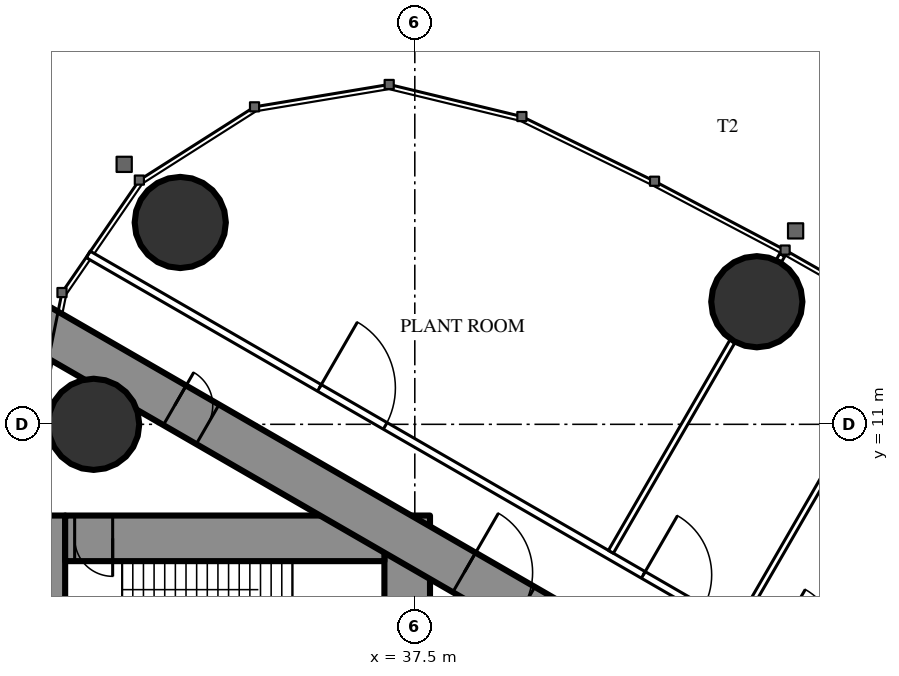
"""IFC4 building model, lengths in metres.
Left out: names, types, materials, properties, quantities, classifications, styles, units other than length and angle.
Written with IfcOpenShell. Run it as: python <this file> out.ifc"""

import sys

from ifc_helpers import new_model, si_unit, direction, frame, frame_2d, origin, origin_2d, place, context, subcontext, project, spatial, rectangle, circle, extrude, element, fill, save


model = new_model("IFC4")
c1 = context("Model", 3, precision=1e-05, world=origin(), true_north=direction((0.0, 1.0)))
c2 = subcontext(c1, "Body", "Model", "MODEL_VIEW")
j1 = project(units=[si_unit("LENGTHUNIT", "METRE"), si_unit("PLANEANGLEUNIT", "RADIAN")], contexts=[c1])
p1 = place(None, origin())
s1 = spatial("IfcSite", under=j1, at=p1, CompositionType="ELEMENT")
p2 = place(p1, origin())
s2 = spatial("IfcBuilding", under=s1, at=p2, CompositionType="ELEMENT")
p3 = place(p2, frame((0.0, 0.0, 257.3)))
s3 = spatial("IfcBuildingStorey", under=s2, at=p3, CompositionType="ELEMENT", Elevation=257.3)
for number, where, z_axis, x_axis in (
    (1, (31.328, 16.311, 0.0), (0.0, 0.0, 1.0), (1.0, 0.0, 0.0)),
    (2, (29.05, 11.0, 0.0), (0.0, 0.0, 1.0), (1.0, 0.0, 0.0)),
    (3, (46.499, 14.226, 0.0), (0.0, 0.0, 1.0), (1.0, 0.0, 0.0)),
):
    element("IfcColumn", number, at=place(p3, frame(where, z_axis=z_axis, x_axis=x_axis)), inside=s3, PredefinedType="COLUMN", context=c2, shape_type="SweptSolid", body=[
        extrude(circle(Radius=1.2, at=origin_2d()), origin(), (0.0, 0.0, 1.0), 6.0),
    ])
p4 = place(p3, frame((27.9, -8.6, 0.0), z_axis=(0.0, 0.0, 1.0), x_axis=(0.0, 1.0, 0.0)))
e4 = element("IfcWall", 4, at=p4, inside=s3, PredefinedType="SHEAR", context=c2, shape_type="SweptSolid", body=[
    extrude(rectangle(XDim=17.2, YDim=0.8, at=frame_2d((8.6, 0.0))), origin(), (0.0, 0.0, 1.0), 6.0),
])
p5 = place(p4, frame((9.35, 0.0, 0.0)))
e5 = element("IfcOpeningElement", 5, at=p5, cuts=e4, PredefinedType="OPENING", context=c2, shape_type="SweptSolid", body=[
    extrude(rectangle(XDim=0.9, YDim=2.2, at=frame_2d((0.45, 1.1))), frame((0.0, 0.41, 0.0), z_axis=(0.0, -1.0, 0.0), x_axis=(1.0, 0.0, 0.0)), (0.0, 0.0, 1.0), 0.82),
])
p6 = place(p3, frame((37.3, -8.6, 0.0), z_axis=(0.0, 0.0, 1.0), x_axis=(0.0, 1.0, 0.0)))
e6 = element("IfcWall", 6, at=p6, inside=s3, PredefinedType="SHEAR", context=c2, shape_type="SweptSolid", body=[
    extrude(rectangle(XDim=17.2, YDim=1.2, at=frame_2d((8.6, 0.0))), origin(), (0.0, 0.0, 1.0), 6.0),
])
p7 = place(p6, frame((7.7, 0.0, 0.0)))
e7 = element("IfcOpeningElement", 7, at=p7, cuts=e6, PredefinedType="OPENING", context=c2, shape_type="SweptSolid", body=[
    extrude(rectangle(XDim=1.8, YDim=2.2, at=frame_2d((0.9, 1.1))), frame((0.0, 0.61, 0.0), z_axis=(0.0, -1.0, 0.0), x_axis=(1.0, 0.0, 0.0)), (0.0, 0.0, 1.0), 1.22),
])
p8 = place(p3, frame((28.3, 8.0, 0.0), z_axis=(0.0, 0.0, 1.0), x_axis=(1.0, 0.0, 0.0)))
e8 = element("IfcWall", 8, at=p8, inside=s3, PredefinedType="SHEAR", context=c2, shape_type="SweptSolid", body=[
    extrude(rectangle(XDim=8.4, YDim=1.2, at=frame_2d((4.2, 0.0))), origin(), (0.0, 0.0, 1.0), 6.0),
])
p9 = place(p8, frame((0.25, 0.0, 0.0)))
e9 = element("IfcOpeningElement", 9, at=p9, cuts=e8, PredefinedType="OPENING", context=c2, shape_type="SweptSolid", body=[
    extrude(rectangle(XDim=1.0, YDim=2.2, at=frame_2d((0.5, 1.1))), frame((0.0, 0.61, 0.0), z_axis=(0.0, -1.0, 0.0), x_axis=(1.0, 0.0, 0.0)), (0.0, 0.0, 1.0), 1.22),
])
p10 = place(p3, frame((27.2, 13.8, 0.0), z_axis=(0.0, 0.0, 1.0), x_axis=(0.866024515034, -0.500001539357, 0.0)))
e10 = element("IfcWall", 10, at=p10, inside=s3, PredefinedType="SHEAR", context=c2, shape_type="SweptSolid", body=[
    extrude(rectangle(XDim=26.907, YDim=1.2, at=frame_2d((13.454, 0.0))), origin(), (0.0, 0.0, 1.0), 6.0),
])
p11 = place(p10, frame((4.6, 0.0, 0.0)))
e11 = element("IfcOpeningElement", 11, at=p11, cuts=e10, PredefinedType="OPENING", context=c2, shape_type="SweptSolid", body=[
    extrude(rectangle(XDim=1.0, YDim=2.2, at=frame_2d((0.5, 1.1))), frame((0.0, 0.61, 0.0), z_axis=(0.0, -1.0, 0.0), x_axis=(1.0, 0.0, 0.0)), (0.0, 0.0, 1.0), 1.22),
])
p12 = place(p10, frame((13.395, 0.0, 0.0)))
e12 = element("IfcOpeningElement", 12, at=p12, cuts=e10, PredefinedType="OPENING", context=c2, shape_type="SweptSolid", body=[
    extrude(rectangle(XDim=1.8, YDim=2.2, at=frame_2d((0.9, 1.1))), frame((0.0, 0.61, 0.0), z_axis=(0.0, -1.0, 0.0), x_axis=(1.0, 0.0, 0.0)), (0.0, 0.0, 1.0), 1.22),
])
p13 = place(p3, frame((28.907, 15.47, 0.0), z_axis=(0.0, 0.0, 1.0), x_axis=(0.866025841386, -0.499999242051, 0.0)))
e13 = element("IfcWall", 13, at=p13, inside=s3, PredefinedType="PARTITIONING", context=c2, shape_type="SweptSolid", body=[
    extrude(rectangle(XDim=30.821, YDim=0.2, at=frame_2d((15.41, 0.0))), origin(), (0.0, 0.0, 1.0), 5.75),
])
p14 = place(p13, frame((26.092, 0.0, 0.0)))
e14 = element("IfcOpeningElement", 14, at=p14, cuts=e13, PredefinedType="OPENING", context=c2, shape_type="SweptSolid", body=[
    extrude(rectangle(XDim=2.0, YDim=2.4, at=frame_2d((1.0, 1.2))), frame((0.0, 0.11, 0.0), z_axis=(0.0, -1.0, 0.0), x_axis=(1.0, 0.0, 0.0)), (0.0, 0.0, 1.0), 0.22),
])
p15 = place(p13, frame((20.748, 0.0, 0.0)))
e15 = element("IfcOpeningElement", 15, at=p15, cuts=e13, PredefinedType="OPENING", context=c2, shape_type="SweptSolid", body=[
    extrude(rectangle(XDim=1.8, YDim=2.2, at=frame_2d((0.9, 1.1))), frame((0.0, 0.11, 0.0), z_axis=(0.0, -1.0, 0.0), x_axis=(1.0, 0.0, 0.0)), (0.0, 0.0, 1.0), 0.22),
])
p16 = place(p13, frame((16.865, 0.0, 0.0)))
e16 = element("IfcOpeningElement", 16, at=p16, cuts=e13, PredefinedType="OPENING", context=c2, shape_type="SweptSolid", body=[
    extrude(rectangle(XDim=1.8, YDim=2.2, at=frame_2d((0.9, 1.1))), frame((0.0, 0.11, 0.0), z_axis=(0.0, -1.0, 0.0), x_axis=(1.0, 0.0, 0.0)), (0.0, 0.0, 1.0), 0.22),
])
p17 = place(p13, frame((7.024, 0.0, 0.0)))
e17 = element("IfcOpeningElement", 17, at=p17, cuts=e13, PredefinedType="OPENING", context=c2, shape_type="SweptSolid", body=[
    extrude(rectangle(XDim=2.0, YDim=2.4, at=frame_2d((1.0, 1.2))), frame((0.0, 0.11, 0.0), z_axis=(0.0, -1.0, 0.0), x_axis=(1.0, 0.0, 0.0)), (0.0, 0.0, 1.0), 0.22),
])
p18 = place(p3, frame((42.66, 7.646, 0.0), z_axis=(0.0, 0.0, 1.0), x_axis=(0.499996592859, 0.866027370889, 0.0)))
e18 = element("IfcWall", 18, at=p18, inside=s3, PredefinedType="PARTITIONING", context=c2, shape_type="SweptSolid", body=[
    extrude(rectangle(XDim=6.398, YDim=0.15, at=frame_2d((3.199, 0.0))), origin(), (0.0, 0.0, 1.0), 4.85),
])
p19 = place(p3, frame((47.079, 15.3, 0.0), z_axis=(0.0, 0.0, 1.0), x_axis=(0.499212083968, 0.866479829667, 0.0)))
e19 = element("IfcWall", 19, at=p19, inside=s3, PredefinedType="PARTITIONING", context=c2, shape_type="SweptSolid", body=[
    extrude(rectangle(XDim=0.179, YDim=0.15, at=frame_2d((0.09, 0.0))), origin(), (0.0, 0.0, 1.0), 4.85),
])
p20 = place(p3, frame((46.023, 5.704, 0.0), z_axis=(0.0, 0.0, 1.0), x_axis=(0.499984478165, 0.866034365135, 0.0)))
e20 = element("IfcWall", 20, at=p20, inside=s3, PredefinedType="PARTITIONING", context=c2, shape_type="SweptSolid", body=[
    extrude(rectangle(XDim=6.426, YDim=0.15, at=frame_2d((3.213, 0.0))), origin(), (0.0, 0.0, 1.0), 4.85),
])
p21 = place(p16, origin())
e21 = element("IfcDoor", 21, at=p21, inside=s3, OperationType="DOUBLE_DOOR_SINGLE_SWING", PredefinedType="DOOR", context=c2, shape_type="SweptSolid", body=[
    extrude(rectangle(XDim=1.8, YDim=2.2, at=frame_2d((0.9, 1.1))), frame((0.0, 0.025, 0.0), z_axis=(0.0, -1.0, 0.0), x_axis=(1.0, 0.0, 0.0)), (0.0, 0.0, 1.0), 0.05),
])
fill(e16, e21)
p22 = place(p17, origin())
e22 = element("IfcDoor", 22, at=p22, inside=s3, OperationType="DOUBLE_DOOR_SINGLE_SWING", PredefinedType="DOOR", context=c2, shape_type="SweptSolid", body=[
    extrude(rectangle(XDim=2.0, YDim=2.4, at=frame_2d((1.0, 1.2))), frame((0.0, 0.025, 0.0), z_axis=(0.0, -1.0, 0.0), x_axis=(1.0, 0.0, 0.0)), (0.0, 0.0, 1.0), 0.05),
])
fill(e17, e22)
p23 = place(p11, origin())
e23 = element("IfcDoor", 23, at=p23, inside=s3, OperationType="SINGLE_SWING_LEFT", PredefinedType="DOOR", context=c2, shape_type="SweptSolid", body=[
    extrude(rectangle(XDim=1.0, YDim=2.2, at=frame_2d((0.5, 1.1))), frame((0.0, 0.025, 0.0), z_axis=(0.0, -1.0, 0.0), x_axis=(1.0, 0.0, 0.0)), (0.0, 0.0, 1.0), 0.05),
])
fill(e11, e23)
p24 = place(p12, origin())
e24 = element("IfcDoor", 24, at=p24, inside=s3, OperationType="DOUBLE_DOOR_SINGLE_SWING", PredefinedType="DOOR", context=c2, shape_type="SweptSolid", body=[
    extrude(rectangle(XDim=1.8, YDim=2.2, at=frame_2d((0.9, 1.1))), frame((0.0, 0.025, 0.0), z_axis=(0.0, -1.0, 0.0), x_axis=(1.0, 0.0, 0.0)), (0.0, 0.0, 1.0), 0.05),
])
fill(e12, e24)
p25 = place(p9, origin())
e25 = element("IfcDoor", 25, at=p25, inside=s3, OperationType="SINGLE_SWING_RIGHT", PredefinedType="DOOR", context=c2, shape_type="SweptSolid", body=[
    extrude(rectangle(XDim=1.0, YDim=2.2, at=frame_2d((0.5, 1.1))), frame((0.0, 0.025, 0.0), z_axis=(0.0, -1.0, 0.0), x_axis=(1.0, 0.0, 0.0)), (0.0, 0.0, 1.0), 0.05),
])
fill(e9, e25)
save(model, sys.argv[1])
